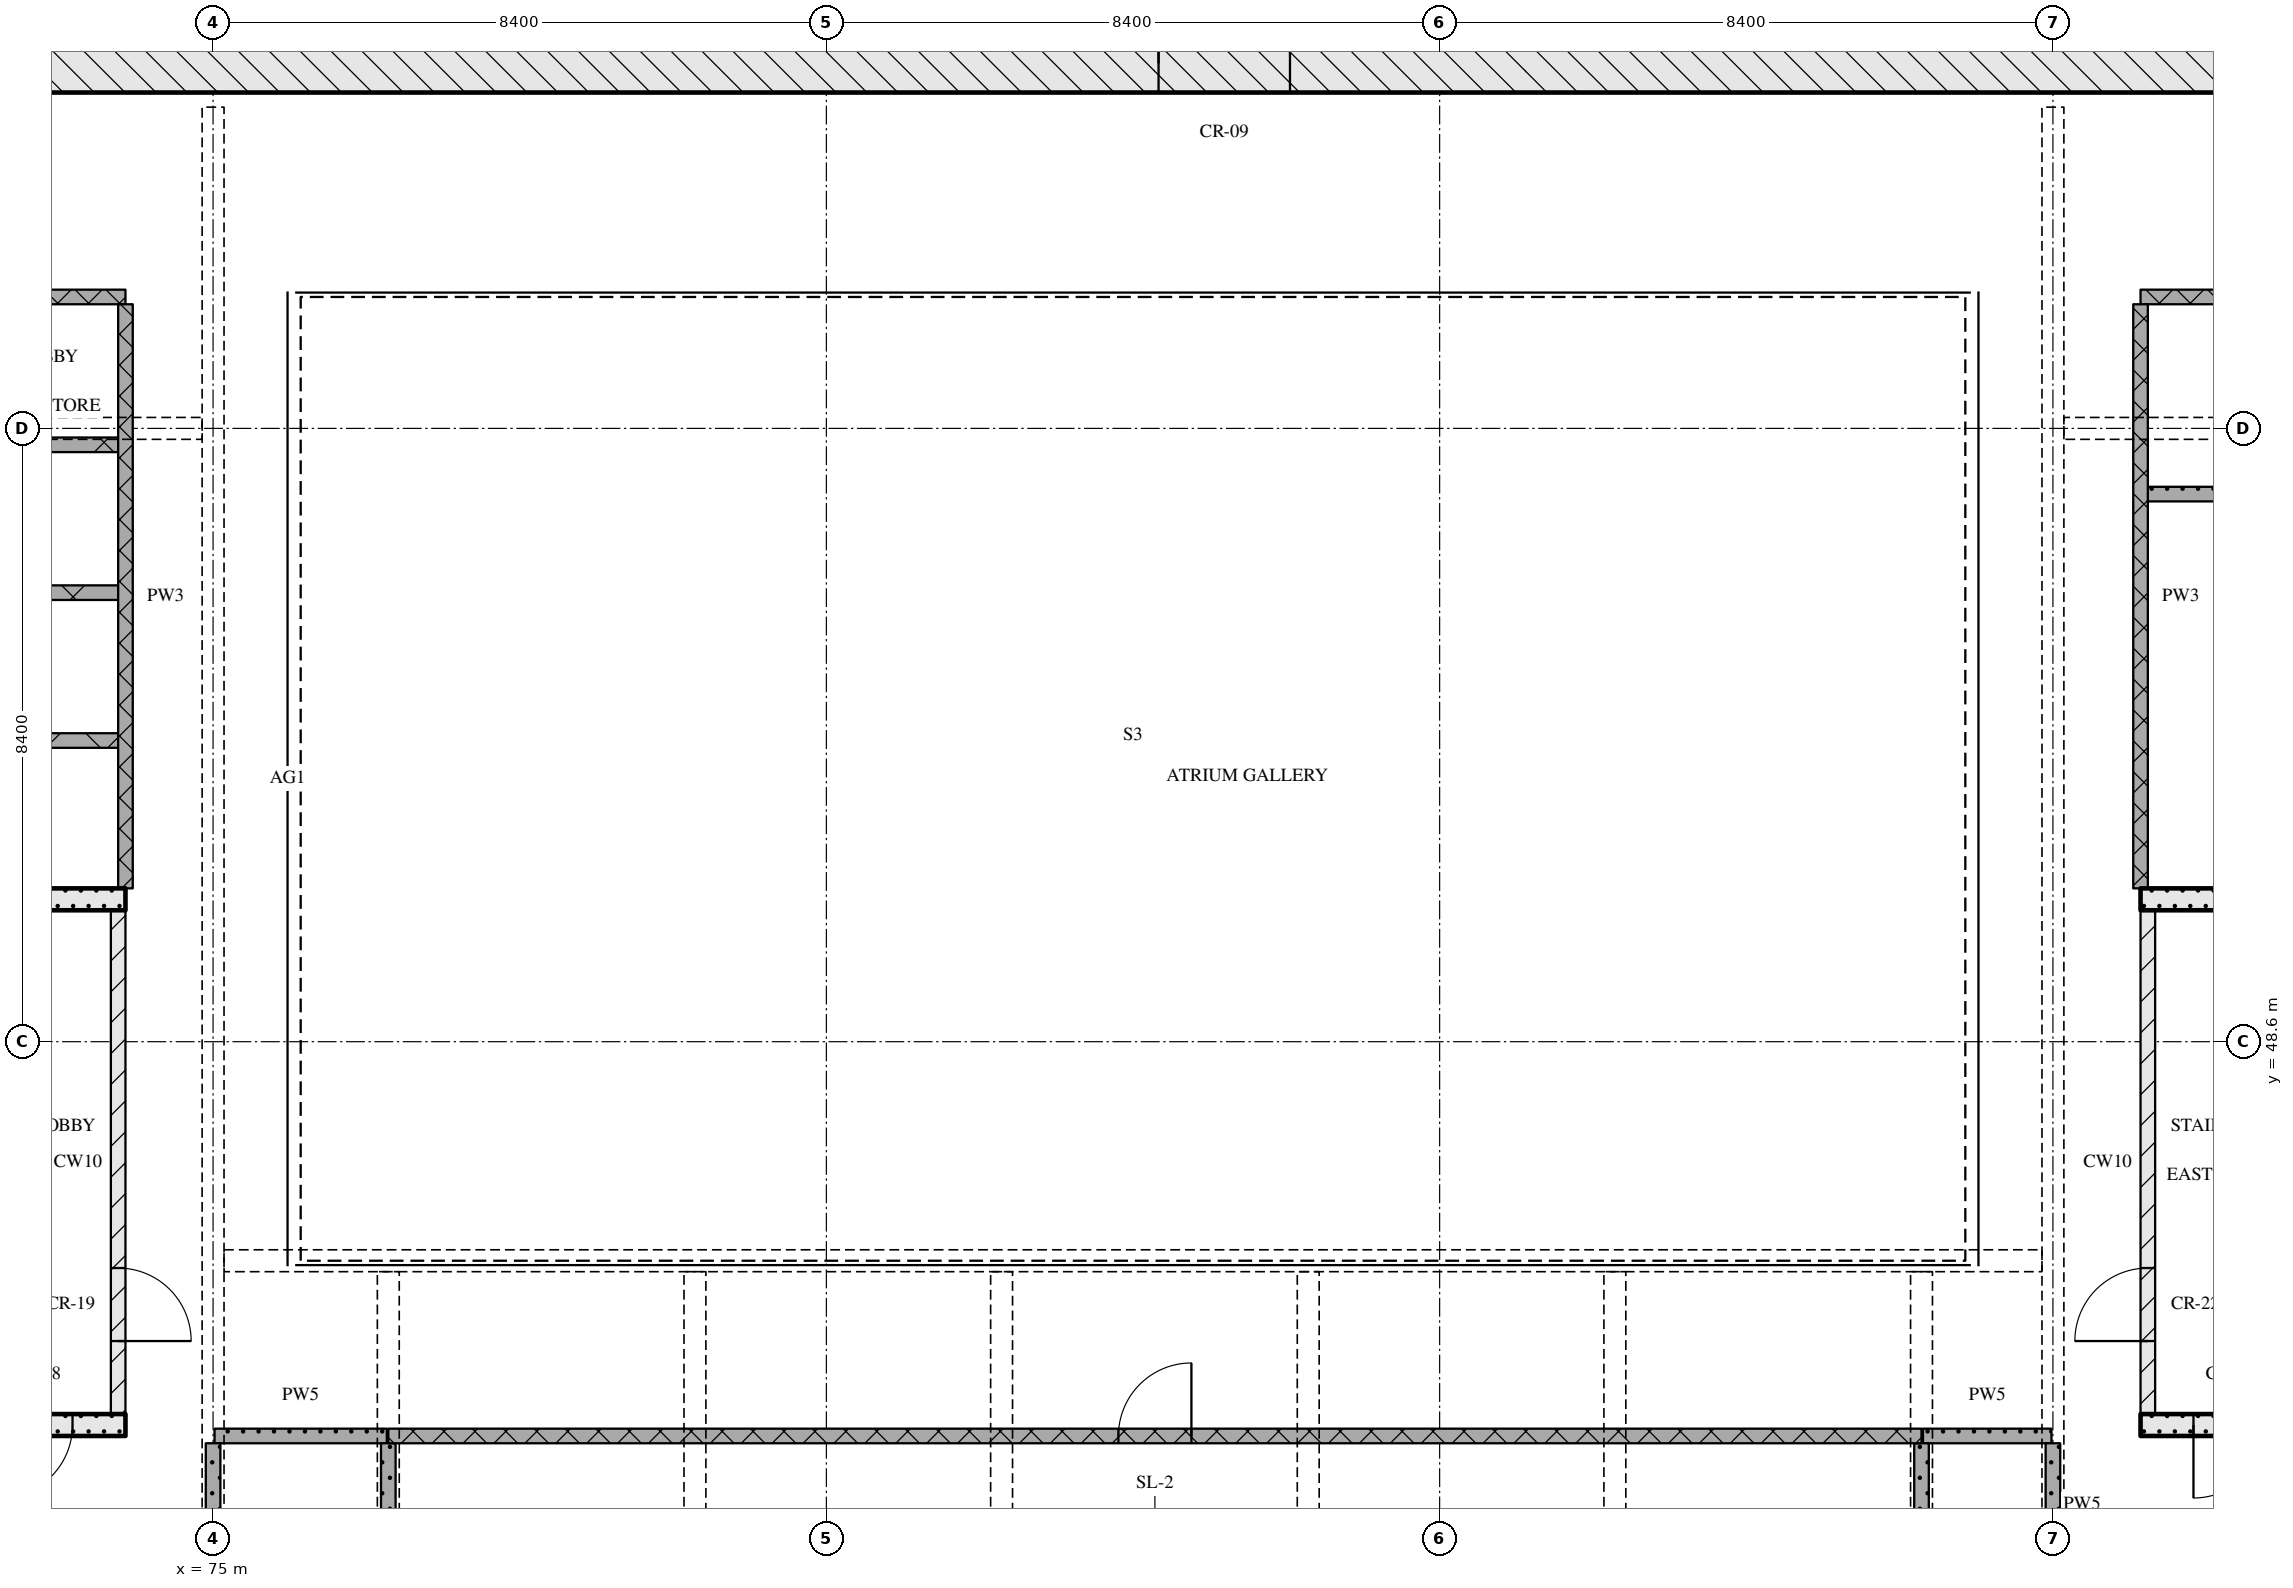
"""IFC4 building model, lengths in metres.
Left out: names, types, materials, properties, quantities, classifications, styles, units other than length and angle.
Written with IfcOpenShell. Run it as: python <this file> out.ifc"""

import sys

from ifc_helpers import new_model, si_unit, direction, frame, frame_2d, origin, place, context, subcontext, project, spatial, rectangle, extrude, element, fill, save


model = new_model("IFC4")
c1 = context("Model", 3, precision=1e-05, world=origin(), true_north=direction((0.0, 1.0)))
c2 = subcontext(c1, "Body", "Model", "MODEL_VIEW")
j1 = project(units=[si_unit("LENGTHUNIT", "METRE"), si_unit("PLANEANGLEUNIT", "RADIAN")], contexts=[c1])
p1 = place(None, origin())
s1 = spatial("IfcSite", under=j1, at=p1, CompositionType="ELEMENT")
p2 = place(p1, origin())
s2 = spatial("IfcBuilding", under=s1, at=p2, CompositionType="ELEMENT")
p3 = place(p2, frame((0.0, 0.0, 142.05)))
s3 = spatial("IfcBuildingStorey", under=s2, at=p3, CompositionType="ELEMENT", Elevation=142.05)
p4 = place(p3, frame((67.0, 62.0, 0.0), z_axis=(0.0, 0.0, 1.0), x_axis=(1.0, 0.0, 0.0)))
e1 = element("IfcWall", 1, at=p4, inside=s3, PredefinedType="SOLIDWALL", context=c2, shape_type="SweptSolid", body=[
    extrude(rectangle(XDim=41.2, YDim=0.8, at=frame_2d((20.6, 0.0))), origin(), (0.0, 0.0, 1.0), 5.12),
])
p5 = place(p4, frame((20.95, 0.0, 0.0)))
e2 = element("IfcOpeningElement", 2, at=p5, cuts=e1, PredefinedType="OPENING", context=c2, shape_type="SweptSolid", body=[
    extrude(rectangle(XDim=1.8, YDim=2.1, at=frame_2d((0.9, 1.05))), frame((0.0, 0.41, 0.0), z_axis=(0.0, -1.0, 0.0), x_axis=(1.0, 0.0, 0.0)), (0.0, 0.0, 1.0), 0.82),
])
p6 = place(p3, frame((68.2, 43.35, 0.0), z_axis=(0.0, 0.0, 1.0), x_axis=(1.0, 0.0, 0.0)))
e3 = element("IfcWall", 3, at=p6, inside=s3, PredefinedType="SOLIDWALL", context=c2, shape_type="SweptSolid", body=[
    extrude(rectangle(XDim=5.6, YDim=0.3, at=frame_2d((2.8, 0.0))), origin(), (0.0, 0.0, 1.0), 5.12),
])
p7 = place(p6, frame((3.875, 0.0, 0.0)))
e4 = element("IfcOpeningElement", 4, at=p7, cuts=e3, PredefinedType="OPENING", context=c2, shape_type="SweptSolid", body=[
    extrude(rectangle(XDim=1.0, YDim=2.1, at=frame_2d((0.5, 1.05))), frame((0.0, 0.16, 0.0), z_axis=(0.0, -1.0, 0.0), x_axis=(1.0, 0.0, 0.0)), (0.0, 0.0, 1.0), 0.32),
])
p8 = place(p3, frame((73.7, 43.5, 0.0), z_axis=(0.0, 0.0, 1.0), x_axis=(0.0, 1.0, 0.0)))
e5 = element("IfcWall", 5, at=p8, inside=s3, PredefinedType="PARTITIONING", context=c2, shape_type="SweptSolid", body=[
    extrude(rectangle(XDim=6.9, YDim=0.2, at=frame_2d((3.45, 0.0))), origin(), (0.0, 0.0, 1.0), 5.12),
])
p9 = place(p8, frame((1.0, 0.0, 0.0)))
e6 = element("IfcOpeningElement", 6, at=p9, cuts=e5, PredefinedType="OPENING", context=c2, shape_type="SweptSolid", body=[
    extrude(rectangle(XDim=1.0, YDim=2.1, at=frame_2d((0.5, 1.05))), frame((0.0, 0.11, 0.0), z_axis=(0.0, -1.0, 0.0), x_axis=(1.0, 0.0, 0.0)), (0.0, 0.0, 1.0), 0.22),
])
p10 = place(p3, frame((68.2, 50.55, 0.0), z_axis=(0.0, 0.0, 1.0), x_axis=(1.0, 0.0, 0.0)))
e7 = element("IfcWall", 7, at=p10, inside=s3, PredefinedType="SOLIDWALL", context=c2, shape_type="SweptSolid", body=[
    extrude(rectangle(XDim=5.6, YDim=0.3, at=frame_2d((2.8, 0.0))), origin(), (0.0, 0.0, 1.0), 5.12),
])
p11 = place(p3, frame((101.4, 43.35, 0.0), z_axis=(0.0, 0.0, 1.0), x_axis=(1.0, 0.0, 0.0)))
e8 = element("IfcWall", 8, at=p11, inside=s3, PredefinedType="SOLIDWALL", context=c2, shape_type="SweptSolid", body=[
    extrude(rectangle(XDim=5.6, YDim=0.3, at=frame_2d((2.8, 0.0))), origin(), (0.0, 0.0, 1.0), 5.12),
])
p12 = place(p11, frame((0.725, 0.0, 0.0)))
e9 = element("IfcOpeningElement", 9, at=p12, cuts=e8, PredefinedType="OPENING", context=c2, shape_type="SweptSolid", body=[
    extrude(rectangle(XDim=1.0, YDim=2.1, at=frame_2d((0.5, 1.05))), frame((0.0, 0.16, 0.0), z_axis=(0.0, -1.0, 0.0), x_axis=(1.0, 0.0, 0.0)), (0.0, 0.0, 1.0), 0.32),
])
p13 = place(p3, frame((101.5, 43.5, 0.0), z_axis=(0.0, 0.0, 1.0), x_axis=(0.0, 1.0, 0.0)))
e10 = element("IfcWall", 10, at=p13, inside=s3, PredefinedType="PARTITIONING", context=c2, shape_type="SweptSolid", body=[
    extrude(rectangle(XDim=6.9, YDim=0.2, at=frame_2d((3.45, 0.0))), origin(), (0.0, 0.0, 1.0), 5.12),
])
p14 = place(p13, frame((1.0, 0.0, 0.0)))
e11 = element("IfcOpeningElement", 11, at=p14, cuts=e10, PredefinedType="OPENING", context=c2, shape_type="SweptSolid", body=[
    extrude(rectangle(XDim=1.0, YDim=2.1, at=frame_2d((0.5, 1.05))), frame((0.0, 0.11, 0.0), z_axis=(0.0, -1.0, 0.0), x_axis=(1.0, 0.0, 0.0)), (0.0, 0.0, 1.0), 0.22),
])
p15 = place(p3, frame((101.4, 50.55, 0.0), z_axis=(0.0, 0.0, 1.0), x_axis=(1.0, 0.0, 0.0)))
e12 = element("IfcWall", 12, at=p15, inside=s3, PredefinedType="SOLIDWALL", context=c2, shape_type="SweptSolid", body=[
    extrude(rectangle(XDim=5.6, YDim=0.3, at=frame_2d((2.8, 0.0))), origin(), (0.0, 0.0, 1.0), 5.12),
])
p16 = place(p3, frame((98.4, 43.2, 0.0), z_axis=(0.0, 0.0, 1.0), x_axis=(-1.0, 0.0, 0.0)))
e13 = element("IfcWall", 13, at=p16, inside=s3, PredefinedType="PARTITIONING", context=c2, shape_type="SweptSolid", body=[
    extrude(rectangle(XDim=21.0, YDim=0.2, at=frame_2d((10.5, 0.0))), origin(), (0.0, 0.0, 1.0), 5.12),
])
p17 = place(p16, frame((10.0, 0.0, 0.0)))
e14 = element("IfcOpeningElement", 14, at=p17, cuts=e13, PredefinedType="OPENING", context=c2, shape_type="SweptSolid", body=[
    extrude(rectangle(XDim=1.0, YDim=2.1, at=frame_2d((0.5, 1.05))), frame((0.0, 0.11, 0.0), z_axis=(0.0, -1.0, 0.0), x_axis=(1.0, 0.0, 0.0)), (0.0, 0.0, 1.0), 0.22),
])
p18 = place(p3, frame((75.02, 43.2, 0.0), z_axis=(0.0, 0.0, 1.0), x_axis=(1.0, 0.0, 0.0)))
e15 = element("IfcWall", 15, at=p18, inside=s3, PredefinedType="PARTITIONING", context=c2, shape_type="SweptSolid", body=[
    extrude(rectangle(XDim=2.36, YDim=0.2, at=frame_2d((1.18, 0.0))), origin(), (0.0, 0.0, 1.0), 5.12),
])
p19 = place(p3, frame((98.42, 43.2, 0.0), z_axis=(0.0, 0.0, 1.0), x_axis=(1.0, 0.0, 0.0)))
e16 = element("IfcWall", 16, at=p19, inside=s3, PredefinedType="PARTITIONING", context=c2, shape_type="SweptSolid", body=[
    extrude(rectangle(XDim=1.76, YDim=0.2, at=frame_2d((0.88, 0.0))), origin(), (0.0, 0.0, 1.0), 5.12),
])
for number, where, z_axis, x_axis in (
    (17, (66.7, 52.725, 0.0), (0.0, 0.0, 1.0), (1.0, 0.0, 0.0)),
    (18, (66.7, 54.75, 0.0), (0.0, 0.0, 1.0), (1.0, 0.0, 0.0)),
    (19, (101.5, 56.1, 0.0), (0.0, 0.0, 1.0), (1.0, 0.0, 0.0)),
):
    element("IfcWall", number, at=place(p3, frame(where, z_axis=z_axis, x_axis=x_axis)), inside=s3, PredefinedType="PARTITIONING", context=c2, shape_type="SweptSolid", body=[
        extrude(rectangle(XDim=7.0, YDim=0.2, at=frame_2d((3.5, 0.0))), origin(), (0.0, 0.0, 1.0), 5.12),
    ])
p20 = place(p3, frame((66.97, 56.775, 0.0), z_axis=(0.0, 0.0, 1.0), x_axis=(1.0, 0.0, 0.0)))
e20 = element("IfcWall", 20, at=p20, inside=s3, PredefinedType="PARTITIONING", context=c2, shape_type="SweptSolid", body=[
    extrude(rectangle(XDim=6.73, YDim=0.2, at=frame_2d((3.365, 0.0))), origin(), (0.0, 0.0, 1.0), 5.12),
])
p21 = place(p3, frame((73.8, 58.8, 0.0), z_axis=(0.0, 0.0, 1.0), x_axis=(-1.0, 0.0, 0.0)))
e21 = element("IfcWall", 21, at=p21, inside=s3, PredefinedType="PARTITIONING", context=c2, shape_type="SweptSolid", body=[
    extrude(rectangle(XDim=7.2, YDim=0.2, at=frame_2d((3.6, 0.0))), origin(), (0.0, 0.0, 1.0), 5.12),
])
p22 = place(p21, frame((3.15, 0.0, 0.0)))
e22 = element("IfcOpeningElement", 22, at=p22, cuts=e21, PredefinedType="OPENING", context=c2, shape_type="SweptSolid", body=[
    extrude(rectangle(XDim=0.9, YDim=2.1, at=frame_2d((0.45, 1.05))), frame((0.0, 0.11, 0.0), z_axis=(0.0, -1.0, 0.0), x_axis=(1.0, 0.0, 0.0)), (0.0, 0.0, 1.0), 0.22),
])
p23 = place(p3, frame((108.6, 58.8, 0.0), z_axis=(0.0, 0.0, 1.0), x_axis=(-1.0, 0.0, 0.0)))
e23 = element("IfcWall", 23, at=p23, inside=s3, PredefinedType="PARTITIONING", context=c2, shape_type="SweptSolid", body=[
    extrude(rectangle(XDim=7.2, YDim=0.2, at=frame_2d((3.6, 0.0))), origin(), (0.0, 0.0, 1.0), 5.12),
])
p24 = place(p23, frame((3.15, 0.0, 0.0)))
e24 = element("IfcOpeningElement", 24, at=p24, cuts=e23, PredefinedType="OPENING", context=c2, shape_type="SweptSolid", body=[
    extrude(rectangle(XDim=0.9, YDim=2.1, at=frame_2d((0.45, 1.05))), frame((0.0, 0.11, 0.0), z_axis=(0.0, -1.0, 0.0), x_axis=(1.0, 0.0, 0.0)), (0.0, 0.0, 1.0), 0.22),
])
p25 = place(p3, frame((73.8, 58.7, 0.0), z_axis=(0.0, 0.0, 1.0), x_axis=(0.0, -1.0, 0.0)))
e25 = element("IfcWall", 25, at=p25, inside=s3, PredefinedType="PARTITIONING", context=c2, shape_type="SweptSolid", body=[
    extrude(rectangle(XDim=8.0, YDim=0.2, at=frame_2d((4.0, 0.0))), origin(), (0.0, 0.0, 1.0), 5.12),
])
p26 = place(p3, frame((75.0, 43.1, 0.0), z_axis=(0.0, 0.0, 1.0), x_axis=(0.0, -1.0, 0.0)))
e26 = element("IfcWall", 26, at=p26, inside=s3, PredefinedType="PARTITIONING", context=c2, shape_type="SweptSolid", body=[
    extrude(rectangle(XDim=2.2, YDim=0.2, at=frame_2d((1.1, 0.0))), origin(), (0.0, 0.0, 1.0), 4.23),
])
for number, where, z_axis, x_axis in (
    (27, (77.4, 43.1, 0.0), (0.0, 0.0, 1.0), (0.0, -1.0, 0.0)),
    (28, (98.4, 43.1, 0.0), (0.0, 0.0, 1.0), (0.0, -1.0, 0.0)),
):
    element("IfcWall", number, at=place(p3, frame(where, z_axis=z_axis, x_axis=x_axis)), inside=s3, PredefinedType="PARTITIONING", context=c2, shape_type="SweptSolid", body=[
        extrude(rectangle(XDim=2.2, YDim=0.2, at=frame_2d((1.1, 0.0))), origin(), (0.0, 0.0, 1.0), 5.12),
    ])
p27 = place(p3, frame((100.2, 43.1, 0.0), z_axis=(0.0, 0.0, 1.0), x_axis=(0.0, -1.0, 0.0)))
e29 = element("IfcWall", 29, at=p27, inside=s3, PredefinedType="PARTITIONING", context=c2, shape_type="SweptSolid", body=[
    extrude(rectangle(XDim=2.2, YDim=0.2, at=frame_2d((1.1, 0.0))), origin(), (0.0, 0.0, 1.0), 4.23),
])
p28 = place(p3, frame((101.4, 58.7, 0.0), z_axis=(0.0, 0.0, 1.0), x_axis=(0.0, -1.0, 0.0)))
e30 = element("IfcWall", 30, at=p28, inside=s3, PredefinedType="PARTITIONING", context=c2, shape_type="SweptSolid", body=[
    extrude(rectangle(XDim=8.0, YDim=0.2, at=frame_2d((4.0, 0.0))), origin(), (0.0, 0.0, 1.0), 5.12),
])
p29 = place(p5, origin())
e31 = element("IfcDoor", 31, at=p29, inside=s3, OperationType="DOUBLE_DOOR_SINGLE_SWING", PredefinedType="DOOR", context=c2, shape_type="SweptSolid", body=[
    extrude(rectangle(XDim=1.8, YDim=2.1, at=frame_2d((0.9, 1.05))), frame((0.0, 0.025, 0.0), z_axis=(0.0, -1.0, 0.0), x_axis=(1.0, 0.0, 0.0)), (0.0, 0.0, 1.0), 0.05),
])
fill(e2, e31)
p30 = place(p7, origin())
e32 = element("IfcDoor", 32, at=p30, inside=s3, OperationType="SINGLE_SWING_RIGHT", PredefinedType="DOOR", context=c2, shape_type="SweptSolid", body=[
    extrude(rectangle(XDim=1.0, YDim=2.1, at=frame_2d((0.5, 1.05))), frame((0.0, 0.025, 0.0), z_axis=(0.0, -1.0, 0.0), x_axis=(1.0, 0.0, 0.0)), (0.0, 0.0, 1.0), 0.05),
])
fill(e4, e32)
p31 = place(p9, origin())
e33 = element("IfcDoor", 33, at=p31, inside=s3, OperationType="SINGLE_SWING_RIGHT", PredefinedType="DOOR", context=c2, shape_type="SweptSolid", body=[
    extrude(rectangle(XDim=1.0, YDim=2.1, at=frame_2d((0.5, 1.05))), frame((0.0, 0.025, 0.0), z_axis=(0.0, -1.0, 0.0), x_axis=(1.0, 0.0, 0.0)), (0.0, 0.0, 1.0), 0.05),
])
fill(e6, e33)
p32 = place(p12, origin())
e34 = element("IfcDoor", 34, at=p32, inside=s3, OperationType="SINGLE_SWING_RIGHT", PredefinedType="DOOR", context=c2, shape_type="SweptSolid", body=[
    extrude(rectangle(XDim=1.0, YDim=2.1, at=frame_2d((0.5, 1.05))), frame((0.0, 0.025, 0.0), z_axis=(0.0, -1.0, 0.0), x_axis=(1.0, 0.0, 0.0)), (0.0, 0.0, 1.0), 0.05),
])
fill(e9, e34)
p33 = place(p14, origin())
e35 = element("IfcDoor", 35, at=p33, inside=s3, OperationType="SINGLE_SWING_LEFT", PredefinedType="DOOR", context=c2, shape_type="SweptSolid", body=[
    extrude(rectangle(XDim=1.0, YDim=2.1, at=frame_2d((0.5, 1.05))), frame((0.0, 0.025, 0.0), z_axis=(0.0, -1.0, 0.0), x_axis=(1.0, 0.0, 0.0)), (0.0, 0.0, 1.0), 0.05),
])
fill(e11, e35)
p34 = place(p17, origin())
e36 = element("IfcDoor", 36, at=p34, inside=s3, OperationType="SINGLE_SWING_RIGHT", PredefinedType="DOOR", context=c2, shape_type="SweptSolid", body=[
    extrude(rectangle(XDim=1.0, YDim=2.1, at=frame_2d((0.5, 1.05))), frame((0.0, 0.025, 0.0), z_axis=(0.0, -1.0, 0.0), x_axis=(1.0, 0.0, 0.0)), (0.0, 0.0, 1.0), 0.05),
])
fill(e14, e36)
save(model, sys.argv[1])
